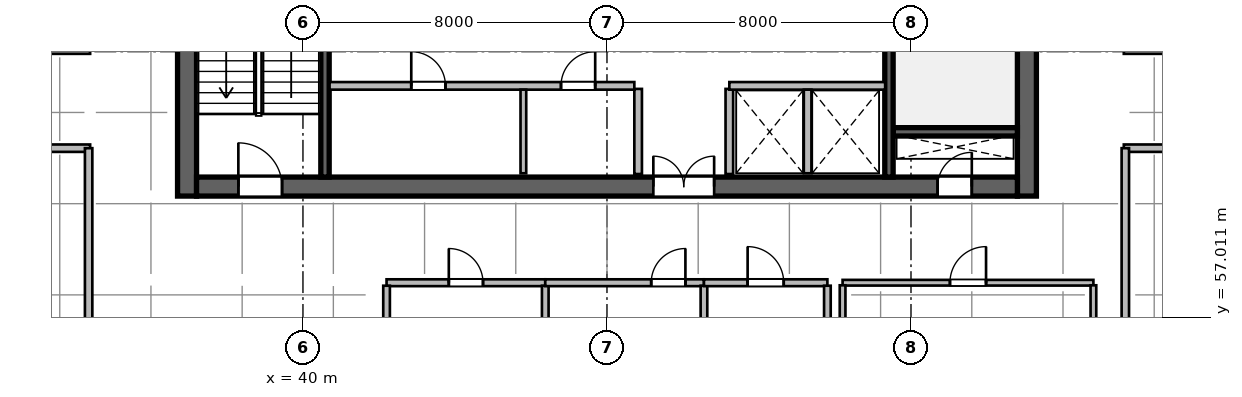
"""IFC4 building model, lengths in metres.
Left out: names, types, materials, properties, quantities, classifications, styles, units other than length and angle.
Written with IfcOpenShell. Run it as: python <this file> out.ifc"""

import sys

from ifc_helpers import new_model, si_unit, direction, frame, frame_2d, origin, place, context, subcontext, project, spatial, rectangle, extrude, source, transform, mapped, element, fill, save


model = new_model("IFC4")
c1 = context("Model", 3, precision=1e-05, world=origin(), true_north=direction((0.0, 1.0)))
c2 = subcontext(c1, "Body", "Model", "MODEL_VIEW")
j1 = project(units=[si_unit("LENGTHUNIT", "METRE"), si_unit("PLANEANGLEUNIT", "RADIAN")], contexts=[c1])
p1 = place(None, origin())
s1 = spatial("IfcSite", under=j1, at=p1, CompositionType="ELEMENT")
p2 = place(p1, origin())
s2 = spatial("IfcBuilding", under=s1, at=p2, CompositionType="ELEMENT")
p3 = place(p2, frame((0.0, 0.0, 111.6)))
s3 = spatial("IfcBuildingStorey", under=s2, at=p3, CompositionType="ELEMENT", Elevation=111.6)
m1 = source(origin(), c2, "Body", "SweptSolid", [
    extrude(rectangle(XDim=12.0, YDim=0.5, at=frame_2d((6.0, 0.0))), origin(), (0.0, 0.0, 1.0), 3.9),
])
for number, where, z_axis, x_axis in (
    (1, (36.95, 60.2, 0.0), (0.0, 0.0, 1.0), (0.0, 1.0, 0.0)),
    (2, (59.05, 60.2, 0.0), (0.0, 0.0, 1.0), (0.0, 1.0, 0.0)),
):
    element("IfcWall", number, at=place(p3, frame(where, z_axis=z_axis, x_axis=x_axis)), inside=s3, PredefinedType="SHEAR", context=c2, shape_type="MappedRepresentation", body=[
        mapped(m1, transform((0.0, 0.0, 0.0), scale=1.0)),
    ])
m2 = source(origin(), c2, "Body", "SweptSolid", [
    extrude(rectangle(XDim=21.6, YDim=0.5, at=frame_2d((10.8, 0.0))), origin(), (0.0, 0.0, 1.0), 3.9),
])
p4 = place(p3, frame((37.2, 60.45, 0.0), z_axis=(0.0, 0.0, 1.0), x_axis=(1.0, 0.0, 0.0)))
e3 = element("IfcWall", 3, at=p4, inside=s3, PredefinedType="SHEAR", context=c2, shape_type="MappedRepresentation", body=[
    mapped(m2, transform((0.0, 0.0, 0.0), scale=1.0)),
])
p5 = place(p4, frame((1.1, 0.0, 0.0)))
e4 = element("IfcOpeningElement", 4, at=p5, cuts=e3, PredefinedType="OPENING", context=c2, shape_type="SweptSolid", body=[
    extrude(rectangle(XDim=1.15, YDim=2.15, at=frame_2d((0.575, 1.075))), frame((0.0, 0.26, 0.0), z_axis=(0.0, -1.0, 0.0), x_axis=(1.0, 0.0, 0.0)), (0.0, 0.0, 1.0), 0.52),
])
p6 = place(p4, frame((19.5, 0.0, 0.0)))
e5 = element("IfcOpeningElement", 5, at=p6, cuts=e3, PredefinedType="OPENING", context=c2, shape_type="SweptSolid", body=[
    extrude(rectangle(XDim=0.9, YDim=2.1, at=frame_2d((0.45, 1.05))), frame((0.0, 0.26, 0.0), z_axis=(0.0, -1.0, 0.0), x_axis=(1.0, 0.0, 0.0)), (0.0, 0.0, 1.0), 0.52),
])
p7 = place(p4, frame((12.02, 0.0, 0.0)))
e6 = element("IfcOpeningElement", 6, at=p7, cuts=e3, PredefinedType="OPENING", context=c2, shape_type="SweptSolid", body=[
    extrude(rectangle(XDim=1.6, YDim=2.15, at=frame_2d((0.8, 1.075))), frame((0.0, 0.26, 0.0), z_axis=(0.0, -1.0, 0.0), x_axis=(1.0, 0.0, 0.0)), (0.0, 0.0, 1.0), 0.52),
])
m3 = source(origin(), c2, "Body", "SweptSolid", [
    extrude(rectangle(XDim=3.27, YDim=0.22, at=frame_2d((1.635, 0.0))), origin(), (0.0, 0.0, 1.0), 3.9),
])
p8 = place(p3, frame((55.53, 61.89, 0.0), z_axis=(0.0, 0.0, 1.0), x_axis=(1.0, 0.0, 0.0)))
e7 = element("IfcWall", 7, at=p8, inside=s3, PredefinedType="SHEAR", context=c2, shape_type="MappedRepresentation", body=[
    mapped(m3, transform((0.0, 0.0, 0.0), scale=1.0)),
])
m4 = source(origin(), c2, "Body", "SweptSolid", [
    extrude(rectangle(XDim=11.0, YDim=0.22, at=frame_2d((5.5, 0.0))), origin(), (0.0, 0.0, 1.0), 3.9),
])
p9 = place(p3, frame((40.58, 60.7, 0.0), z_axis=(0.0, 0.0, 1.0), x_axis=(0.0, 1.0, 0.0)))
e8 = element("IfcWall", 8, at=p9, inside=s3, PredefinedType="SHEAR", context=c2, shape_type="MappedRepresentation", body=[
    mapped(m4, transform((0.0, 0.0, 0.0), scale=1.0)),
])
p10 = place(p3, frame((55.42, 60.7, 0.0), z_axis=(0.0, 0.0, 1.0), x_axis=(0.0, 1.0, 0.0)))
e9 = element("IfcWall", 9, at=p10, inside=s3, PredefinedType="SHEAR", context=c2, shape_type="MappedRepresentation", body=[
    mapped(m4, transform((0.0, 0.0, 0.0), scale=1.0)),
])
p11 = place(p10, frame((9.545, 0.0, 0.0)))
e10 = element("IfcOpeningElement", 10, at=p11, cuts=e9, PredefinedType="OPENING", context=c2, shape_type="SweptSolid", body=[
    extrude(rectangle(XDim=1.15, YDim=2.15, at=frame_2d((0.575, 1.075))), frame((0.0, 0.12, 0.0), z_axis=(0.0, -1.0, 0.0), x_axis=(1.0, 0.0, 0.0)), (0.0, 0.0, 1.0), 0.24),
])
m5 = source(origin(), c2, "Body", "SweptSolid", [
    extrude(rectangle(XDim=2.24, YDim=0.2, at=frame_2d((1.12, 0.0))), origin(), (0.0, 0.0, 1.0), 3.65),
])
for number, where, z_axis, x_axis in (
    (11, (48.82, 60.78, 0.0), (0.0, 0.0, 1.0), (0.0, 1.0, 0.0)),
    (12, (51.22, 60.78, 0.0), (0.0, 0.0, 1.0), (0.0, 1.0, 0.0)),
):
    element("IfcWall", number, at=place(p3, frame(where, z_axis=z_axis, x_axis=x_axis)), inside=s3, PredefinedType="SOLIDWALL", context=c2, shape_type="MappedRepresentation", body=[
        mapped(m5, transform((0.0, 0.0, 0.0), scale=1.0)),
    ])
m6 = source(origin(), c2, "Body", "SweptSolid", [
    extrude(rectangle(XDim=8.02, YDim=0.2, at=frame_2d((4.01, 0.0))), origin(), (0.0, 0.0, 1.0), 3.65),
])
p12 = place(p3, frame((40.7, 63.1, 0.0), z_axis=(0.0, 0.0, 1.0), x_axis=(1.0, 0.0, 0.0)))
e13 = element("IfcWall", 13, at=p12, inside=s3, PredefinedType="SOLIDWALL", context=c2, shape_type="MappedRepresentation", body=[
    mapped(m6, transform((0.0, 0.0, 0.0), scale=1.0)),
])
p13 = place(p12, frame((2.15, 0.0, 0.0)))
e14 = element("IfcOpeningElement", 14, at=p13, cuts=e13, PredefinedType="OPENING", context=c2, shape_type="SweptSolid", body=[
    extrude(rectangle(XDim=0.9, YDim=2.1, at=frame_2d((0.45, 1.05))), frame((0.0, 0.11, 0.0), z_axis=(0.0, -1.0, 0.0), x_axis=(1.0, 0.0, 0.0)), (0.0, 0.0, 1.0), 0.22),
])
p14 = place(p12, frame((6.09, 0.0, 0.0)))
e15 = element("IfcOpeningElement", 15, at=p14, cuts=e13, PredefinedType="OPENING", context=c2, shape_type="SweptSolid", body=[
    extrude(rectangle(XDim=0.9, YDim=2.1, at=frame_2d((0.45, 1.05))), frame((0.0, 0.11, 0.0), z_axis=(0.0, -1.0, 0.0), x_axis=(1.0, 0.0, 0.0)), (0.0, 0.0, 1.0), 0.22),
])
m7 = source(origin(), c2, "Body", "SweptSolid", [
    extrude(rectangle(XDim=4.1, YDim=0.2, at=frame_2d((2.05, 0.0))), origin(), (0.0, 0.0, 1.0), 3.65),
])
p15 = place(p3, frame((51.22, 63.1, 0.0), z_axis=(0.0, 0.0, 1.0), x_axis=(1.0, 0.0, 0.0)))
e16 = element("IfcWall", 16, at=p15, inside=s3, PredefinedType="SOLIDWALL", context=c2, shape_type="MappedRepresentation", body=[
    mapped(m7, transform((0.0, 0.0, 0.0), scale=1.0)),
])
m8 = source(origin(), c2, "Body", "SweptSolid", [
    extrude(rectangle(XDim=2.2, YDim=0.15, at=frame_2d((1.1, 0.0))), origin(), (0.0, 0.0, 1.0), 3.65),
])
p16 = place(p3, frame((45.8, 60.8, 0.0), z_axis=(0.0, 0.0, 1.0), x_axis=(0.0, 1.0, 0.0)))
e17 = element("IfcWall", 17, at=p16, inside=s3, PredefinedType="PARTITIONING", context=c2, shape_type="MappedRepresentation", body=[
    mapped(m8, transform((0.0, 0.0, 0.0), scale=1.0)),
])
m9 = source(origin(), c2, "Body", "SweptSolid", [
    extrude(rectangle(XDim=2.2, YDim=0.2, at=frame_2d((1.1, 0.0))), origin(), (0.0, 0.0, 1.0), 3.65),
])
p17 = place(p3, frame((53.28, 60.8, 0.0), z_axis=(0.0, 0.0, 1.0), x_axis=(0.0, 1.0, 0.0)))
e18 = element("IfcWall", 18, at=p17, inside=s3, PredefinedType="SOLIDWALL", context=c2, shape_type="MappedRepresentation", body=[
    mapped(m9, transform((0.0, 0.0, 0.0), scale=1.0)),
])
m10 = source(origin(), c2, "Body", "SweptSolid", [
    extrude(rectangle(XDim=4.176, YDim=0.18, at=frame_2d((2.088, 0.0))), origin(), (0.0, 0.0, 1.0), 3.65),
])
p18 = place(p3, frame((42.2, 57.92, 0.0), z_axis=(0.0, 0.0, 1.0), x_axis=(1.0, 0.0, 0.0)))
e19 = element("IfcWall", 19, at=p18, inside=s3, PredefinedType="PLUMBINGWALL", context=c2, shape_type="MappedRepresentation", body=[
    mapped(m10, transform((0.0, 0.0, 0.0), scale=1.0)),
])
p19 = place(p18, frame((1.638, 0.0, 0.0)))
e20 = element("IfcOpeningElement", 20, at=p19, cuts=e19, PredefinedType="OPENING", context=c2, shape_type="SweptSolid", body=[
    extrude(rectangle(XDim=0.9, YDim=2.08, at=frame_2d((0.45, 1.04))), frame((0.0, 0.1, 0.0), z_axis=(0.0, -1.0, 0.0), x_axis=(1.0, 0.0, 0.0)), (0.0, 0.0, 1.0), 0.2),
])
m11 = source(origin(), c2, "Body", "SweptSolid", [
    extrude(rectangle(XDim=3.763, YDim=0.175, at=frame_2d((1.881, 0.0))), origin(), (0.0, 0.0, 1.0), 3.65),
])
for number, where, z_axis, x_axis in (
    (21, (42.2, 54.079, 0.0), (0.0, 0.0, 1.0), (0.0, 1.0, 0.0)),
    (22, (46.376, 54.079, 0.0), (0.0, 0.0, 1.0), (0.0, 1.0, 0.0)),
):
    element("IfcWall", number, at=place(p3, frame(where, z_axis=z_axis, x_axis=x_axis)), inside=s3, PredefinedType="PARTITIONING", context=c2, shape_type="MappedRepresentation", body=[
        mapped(m11, transform((0.0, 0.0, 0.0), scale=1.0)),
    ])
p20 = place(p3, frame((46.376, 57.92, 0.0), z_axis=(0.0, 0.0, 1.0), x_axis=(1.0, 0.0, 0.0)))
e23 = element("IfcWall", 23, at=p20, inside=s3, PredefinedType="PLUMBINGWALL", context=c2, shape_type="MappedRepresentation", body=[
    mapped(m10, transform((0.0, 0.0, 0.0), scale=1.0)),
])
p21 = place(p20, frame((2.788, 0.0, 0.0)))
e24 = element("IfcOpeningElement", 24, at=p21, cuts=e23, PredefinedType="OPENING", context=c2, shape_type="SweptSolid", body=[
    extrude(rectangle(XDim=0.9, YDim=2.08, at=frame_2d((0.45, 1.04))), frame((0.0, 0.1, 0.0), z_axis=(0.0, -1.0, 0.0), x_axis=(1.0, 0.0, 0.0)), (0.0, 0.0, 1.0), 0.2),
])
p22 = place(p3, frame((50.552, 54.079, 0.0), z_axis=(0.0, 0.0, 1.0), x_axis=(0.0, 1.0, 0.0)))
e25 = element("IfcWall", 25, at=p22, inside=s3, PredefinedType="PARTITIONING", context=c2, shape_type="MappedRepresentation", body=[
    mapped(m11, transform((0.0, 0.0, 0.0), scale=1.0)),
])
m12 = source(origin(), c2, "Body", "SweptSolid", [
    extrude(rectangle(XDim=3.248, YDim=0.18, at=frame_2d((1.624, 0.0))), origin(), (0.0, 0.0, 1.0), 3.65),
])
p23 = place(p3, frame((50.552, 57.92, 0.0), z_axis=(0.0, 0.0, 1.0), x_axis=(1.0, 0.0, 0.0)))
e26 = element("IfcWall", 26, at=p23, inside=s3, PredefinedType="PLUMBINGWALL", context=c2, shape_type="MappedRepresentation", body=[
    mapped(m12, transform((0.0, 0.0, 0.0), scale=1.0)),
])
p24 = place(p23, frame((1.149, 0.0, 0.0)))
e27 = element("IfcOpeningElement", 27, at=p24, cuts=e26, PredefinedType="OPENING", context=c2, shape_type="SweptSolid", body=[
    extrude(rectangle(XDim=0.95, YDim=2.12, at=frame_2d((0.475, 1.06))), frame((0.0, 0.1, 0.0), z_axis=(0.0, -1.0, 0.0), x_axis=(1.0, 0.0, 0.0)), (0.0, 0.0, 1.0), 0.2),
])
p25 = place(p3, frame((53.8, 54.079, 0.0), z_axis=(0.0, 0.0, 1.0), x_axis=(0.0, 1.0, 0.0)))
e28 = element("IfcWall", 28, at=p25, inside=s3, PredefinedType="PARTITIONING", context=c2, shape_type="MappedRepresentation", body=[
    mapped(m11, transform((0.0, 0.0, 0.0), scale=1.0)),
])
m13 = source(origin(), c2, "Body", "SweptSolid", [
    extrude(rectangle(XDim=6.6, YDim=0.15, at=frame_2d((3.3, 0.0))), origin(), (0.0, 0.0, 1.0), 3.65),
])
p26 = place(p3, frame((54.2, 57.92, 0.0), z_axis=(0.0, 0.0, 1.0), x_axis=(1.0, 0.0, 0.0)))
e29 = element("IfcWall", 29, at=p26, inside=s3, PredefinedType="PARTITIONING", context=c2, shape_type="MappedRepresentation", body=[
    mapped(m13, transform((0.0, 0.0, 0.0), scale=1.0)),
])
p27 = place(p26, frame((2.825, 0.0, 0.0)))
e30 = element("IfcOpeningElement", 30, at=p27, cuts=e29, PredefinedType="OPENING", context=c2, shape_type="SweptSolid", body=[
    extrude(rectangle(XDim=0.95, YDim=2.1, at=frame_2d((0.475, 1.05))), frame((0.0, 0.085, 0.0), z_axis=(0.0, -1.0, 0.0), x_axis=(1.0, 0.0, 0.0)), (0.0, 0.0, 1.0), 0.17),
])
m14 = source(origin(), c2, "Body", "SweptSolid", [
    extrude(rectangle(XDim=3.785, YDim=0.15, at=frame_2d((1.893, 0.0))), origin(), (0.0, 0.0, 1.0), 3.65),
])
for number, where, z_axis, x_axis in (
    (31, (54.2, 54.067, 0.0), (0.0, 0.0, 1.0), (0.0, 1.0, 0.0)),
    (32, (60.8, 54.067, 0.0), (0.0, 0.0, 1.0), (0.0, 1.0, 0.0)),
):
    element("IfcWall", number, at=place(p3, frame(where, z_axis=z_axis, x_axis=x_axis)), inside=s3, PredefinedType="PARTITIONING", context=c2, shape_type="MappedRepresentation", body=[
        mapped(m14, transform((0.0, 0.0, 0.0), scale=1.0)),
    ])
m15 = source(origin(), c2, "Body", "SweptSolid", [
    extrude(rectangle(XDim=7.4, YDim=0.195, at=frame_2d((3.7, 0.0))), origin(), (0.0, 0.0, 1.0), 3.65),
])
p28 = place(p3, frame((27.0, 64.04, 0.0), z_axis=(0.0, 0.0, 1.0), x_axis=(1.0, 0.0, 0.0)))
e33 = element("IfcWall", 33, at=p28, inside=s3, PredefinedType="PARTITIONING", context=c2, shape_type="MappedRepresentation", body=[
    mapped(m15, transform((0.0, 0.0, 0.0), scale=1.0)),
])
p29 = place(p28, frame((3.225, 0.0, 0.0)))
e34 = element("IfcOpeningElement", 34, at=p29, cuts=e33, PredefinedType="OPENING", context=c2, shape_type="SweptSolid", body=[
    extrude(rectangle(XDim=0.95, YDim=2.1, at=frame_2d((0.475, 1.05))), frame((0.0, 0.107, 0.0), z_axis=(0.0, -1.0, 0.0), x_axis=(1.0, 0.0, 0.0)), (0.0, 0.0, 1.0), 0.215),
])
p30 = place(p3, frame((27.0, 61.46, 0.0), z_axis=(0.0, 0.0, 1.0), x_axis=(1.0, 0.0, 0.0)))
e35 = element("IfcWall", 35, at=p30, inside=s3, PredefinedType="PARTITIONING", context=c2, shape_type="MappedRepresentation", body=[
    mapped(m15, transform((0.0, 0.0, 0.0), scale=1.0)),
])
p31 = place(p30, frame((3.225, 0.0, 0.0)))
e36 = element("IfcOpeningElement", 36, at=p31, cuts=e35, PredefinedType="OPENING", context=c2, shape_type="SweptSolid", body=[
    extrude(rectangle(XDim=0.95, YDim=2.1, at=frame_2d((0.475, 1.05))), frame((0.0, 0.107, 0.0), z_axis=(0.0, -1.0, 0.0), x_axis=(1.0, 0.0, 0.0)), (0.0, 0.0, 1.0), 0.215),
])
m16 = source(origin(), c2, "Body", "SweptSolid", [
    extrude(rectangle(XDim=13.988, YDim=0.195, at=frame_2d((6.994, 0.0))), origin(), (0.0, 0.0, 1.0), 3.65),
])
p32 = place(p3, frame((34.36, 47.472, 0.0), z_axis=(0.0, 0.0, 1.0), x_axis=(0.0, 1.0, 0.0)))
e37 = element("IfcWall", 37, at=p32, inside=s3, PredefinedType="PARTITIONING", context=c2, shape_type="MappedRepresentation", body=[
    mapped(m16, transform((0.0, 0.0, 0.0), scale=1.0)),
])
m17 = source(origin(), c2, "Body", "SweptSolid", [
    extrude(rectangle(XDim=6.9, YDim=0.195, at=frame_2d((3.45, 0.0))), origin(), (0.0, 0.0, 1.0), 3.65),
])
p33 = place(p3, frame((61.6, 64.04, 0.0), z_axis=(0.0, 0.0, 1.0), x_axis=(1.0, 0.0, 0.0)))
e38 = element("IfcWall", 38, at=p33, inside=s3, PredefinedType="PARTITIONING", context=c2, shape_type="MappedRepresentation", body=[
    mapped(m17, transform((0.0, 0.0, 0.0), scale=1.0)),
])
p34 = place(p33, frame((2.975, 0.0, 0.0)))
e39 = element("IfcOpeningElement", 39, at=p34, cuts=e38, PredefinedType="OPENING", context=c2, shape_type="SweptSolid", body=[
    extrude(rectangle(XDim=0.95, YDim=2.1, at=frame_2d((0.475, 1.05))), frame((0.0, 0.107, 0.0), z_axis=(0.0, -1.0, 0.0), x_axis=(1.0, 0.0, 0.0)), (0.0, 0.0, 1.0), 0.215),
])
p35 = place(p3, frame((61.6, 61.46, 0.0), z_axis=(0.0, 0.0, 1.0), x_axis=(1.0, 0.0, 0.0)))
e40 = element("IfcWall", 40, at=p35, inside=s3, PredefinedType="PARTITIONING", context=c2, shape_type="MappedRepresentation", body=[
    mapped(m17, transform((0.0, 0.0, 0.0), scale=1.0)),
])
p36 = place(p35, frame((2.975, 0.0, 0.0)))
e41 = element("IfcOpeningElement", 41, at=p36, cuts=e40, PredefinedType="OPENING", context=c2, shape_type="SweptSolid", body=[
    extrude(rectangle(XDim=0.95, YDim=2.1, at=frame_2d((0.475, 1.05))), frame((0.0, 0.107, 0.0), z_axis=(0.0, -1.0, 0.0), x_axis=(1.0, 0.0, 0.0)), (0.0, 0.0, 1.0), 0.215),
])
m18 = source(origin(), c2, "Body", "SweptSolid", [
    extrude(rectangle(XDim=13.988, YDim=0.195, at=frame_2d((6.994, 0.0))), origin(), (0.0, 0.0, 1.0), 2.942),
])
p37 = place(p3, frame((61.64, 47.472, 0.0), z_axis=(0.0, 0.0, 1.0), x_axis=(0.0, 1.0, 0.0)))
e42 = element("IfcWall", 42, at=p37, inside=s3, PredefinedType="PARTITIONING", context=c2, shape_type="MappedRepresentation", body=[
    mapped(m18, transform((0.0, 0.0, 0.0), scale=1.0)),
])
m19 = source(origin(), c2, "Body", "SweptSolid", [
    extrude(rectangle(XDim=1.15, YDim=2.15, at=frame_2d((0.575, 1.075))), frame((0.0, 0.025, 0.0), z_axis=(0.0, -1.0, 0.0), x_axis=(1.0, 0.0, 0.0)), (0.0, 0.0, 1.0), 0.05),
])
p38 = place(p5, origin())
e43 = element("IfcDoor", 43, at=p38, inside=s3, OperationType="SINGLE_SWING_LEFT", PredefinedType="DOOR", context=c2, shape_type="MappedRepresentation", body=[
    mapped(m19, transform((0.0, 0.0, 0.0), scale=1.0)),
])
fill(e4, e43)
m20 = source(origin(), c2, "Body", "SweptSolid", [
    extrude(rectangle(XDim=0.9, YDim=2.1, at=frame_2d((0.45, 1.05))), frame((0.0, 0.025, 0.0), z_axis=(0.0, -1.0, 0.0), x_axis=(1.0, 0.0, 0.0)), (0.0, 0.0, 1.0), 0.05),
])
p39 = place(p6, origin())
e44 = element("IfcDoor", 44, at=p39, inside=s3, OperationType="SINGLE_SWING_RIGHT", PredefinedType="DOOR", context=c2, shape_type="MappedRepresentation", body=[
    mapped(m20, transform((0.0, 0.0, 0.0), scale=1.0)),
])
fill(e5, e44)
m21 = source(origin(), c2, "Body", "SweptSolid", [
    extrude(rectangle(XDim=1.6, YDim=2.15, at=frame_2d((0.8, 1.075))), frame((0.0, 0.025, 0.0), z_axis=(0.0, -1.0, 0.0), x_axis=(1.0, 0.0, 0.0)), (0.0, 0.0, 1.0), 0.05),
])
p40 = place(p7, origin())
e45 = element("IfcDoor", 45, at=p40, inside=s3, OperationType="DOUBLE_DOOR_SINGLE_SWING", PredefinedType="DOOR", context=c2, shape_type="MappedRepresentation", body=[
    mapped(m21, transform((0.0, 0.0, 0.0), scale=1.0)),
])
fill(e6, e45)
p41 = place(p13, origin())
e46 = element("IfcDoor", 46, at=p41, inside=s3, OperationType="SINGLE_SWING_LEFT", PredefinedType="DOOR", context=c2, shape_type="MappedRepresentation", body=[
    mapped(m20, transform((0.0, 0.0, 0.0), scale=1.0)),
])
fill(e14, e46)
p42 = place(p14, origin())
e47 = element("IfcDoor", 47, at=p42, inside=s3, OperationType="SINGLE_SWING_RIGHT", PredefinedType="DOOR", context=c2, shape_type="MappedRepresentation", body=[
    mapped(m20, transform((0.0, 0.0, 0.0), scale=1.0)),
])
fill(e15, e47)
m22 = source(origin(), c2, "Body", "SweptSolid", [
    extrude(rectangle(XDim=0.9, YDim=2.08, at=frame_2d((0.45, 1.04))), frame((0.0, 0.025, 0.0), z_axis=(0.0, -1.0, 0.0), x_axis=(1.0, 0.0, 0.0)), (0.0, 0.0, 1.0), 0.05),
])
p43 = place(p19, origin())
e48 = element("IfcDoor", 48, at=p43, inside=s3, OperationType="SINGLE_SWING_LEFT", PredefinedType="DOOR", context=c2, shape_type="MappedRepresentation", body=[
    mapped(m22, transform((0.0, 0.0, 0.0), scale=1.0)),
])
fill(e20, e48)
p44 = place(p21, origin())
e49 = element("IfcDoor", 49, at=p44, inside=s3, OperationType="SINGLE_SWING_RIGHT", PredefinedType="DOOR", context=c2, shape_type="MappedRepresentation", body=[
    mapped(m22, transform((0.0, 0.0, 0.0), scale=1.0)),
])
fill(e24, e49)
m23 = source(origin(), c2, "Body", "SweptSolid", [
    extrude(rectangle(XDim=0.95, YDim=2.12, at=frame_2d((0.475, 1.06))), frame((0.0, 0.025, 0.0), z_axis=(0.0, -1.0, 0.0), x_axis=(1.0, 0.0, 0.0)), (0.0, 0.0, 1.0), 0.05),
])
p45 = place(p24, origin())
e50 = element("IfcDoor", 50, at=p45, inside=s3, OperationType="SINGLE_SWING_LEFT", PredefinedType="DOOR", context=c2, shape_type="MappedRepresentation", body=[
    mapped(m23, transform((0.0, 0.0, 0.0), scale=1.0)),
])
fill(e27, e50)
m24 = source(origin(), c2, "Body", "SweptSolid", [
    extrude(rectangle(XDim=0.95, YDim=2.1, at=frame_2d((0.475, 1.05))), frame((0.0, 0.025, 0.0), z_axis=(0.0, -1.0, 0.0), x_axis=(1.0, 0.0, 0.0)), (0.0, 0.0, 1.0), 0.05),
])
p46 = place(p27, origin())
e51 = element("IfcDoor", 51, at=p46, inside=s3, OperationType="SINGLE_SWING_RIGHT", PredefinedType="DOOR", context=c2, shape_type="MappedRepresentation", body=[
    mapped(m24, transform((0.0, 0.0, 0.0), scale=1.0)),
])
fill(e30, e51)
save(model, sys.argv[1])
